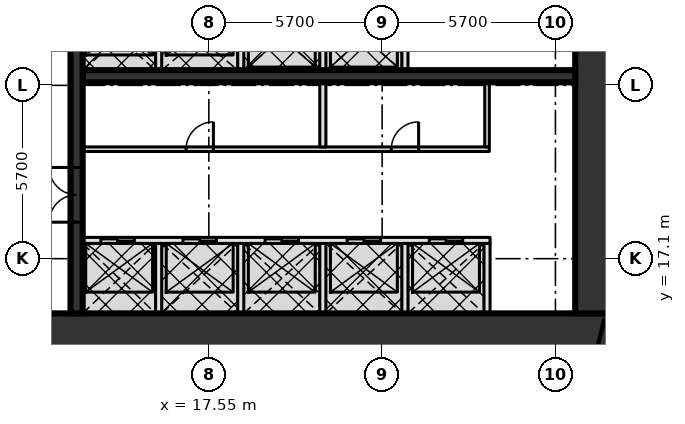
"""IFC4 building model, lengths in metres.
Left out: names, types, materials, properties, quantities, classifications, styles, units other than length and angle.
Written with IfcOpenShell. Run it as: python <this file> out.ifc"""

import sys

from ifc_helpers import new_model, si_unit, direction, frame, frame_2d, origin, place, context, subcontext, project, spatial, rectangle, extrude, element, fill, save


model = new_model("IFC4")
c1 = context("Model", 3, precision=1e-05, world=origin(), true_north=direction((0.0, 1.0)))
c2 = subcontext(c1, "Body", "Model", "MODEL_VIEW")
j1 = project(units=[si_unit("LENGTHUNIT", "METRE"), si_unit("PLANEANGLEUNIT", "RADIAN")], contexts=[c1])
p1 = place(None, origin())
s1 = spatial("IfcSite", under=j1, at=p1, CompositionType="ELEMENT")
p2 = place(p1, origin())
s2 = spatial("IfcBuilding", under=s1, at=p2, CompositionType="ELEMENT")
p3 = place(p2, frame((0.0, 0.0, -9.0)))
s3 = spatial("IfcBuildingStorey", under=s2, at=p3, CompositionType="ELEMENT", Elevation=-9.0)
p4 = place(p3, frame((8.0, 14.7, 0.0), z_axis=(0.0, 0.0, 1.0), x_axis=(1.0, 0.0, 0.0)))
e1 = element("IfcWall", 1, at=p4, inside=s3, PredefinedType="SHEAR", context=c2, shape_type="SweptSolid", body=[
    extrude(rectangle(XDim=22.8, YDim=1.2, at=frame_2d((11.4, 0.0))), origin(), (0.0, 0.0, 1.0), 4.05),
])
p5 = place(p4, frame((2.3, 0.0, 0.0)))
e2 = element("IfcOpeningElement", 2, at=p5, cuts=e1, PredefinedType="OPENING", context=c2, shape_type="SweptSolid", body=[
    extrude(rectangle(XDim=1.8, YDim=2.1, at=frame_2d((0.9, 1.05))), frame((0.0, 0.61, 0.0), z_axis=(0.0, -1.0, 0.0), x_axis=(1.0, 0.0, 0.0)), (0.0, 0.0, 1.0), 1.22),
])
p6 = place(p3, frame((30.2, 15.3, 0.0), z_axis=(0.0, 0.0, 1.0), x_axis=(0.0, 1.0, 0.0)))
e3 = element("IfcWall", 3, at=p6, inside=s3, PredefinedType="SHEAR", context=c2, shape_type="SweptSolid", body=[
    extrude(rectangle(XDim=20.4, YDim=1.2, at=frame_2d((10.2, 0.0))), origin(), (0.0, 0.0, 1.0), 4.05),
])
p7 = place(p3, frame((13.4, 17.7, 0.0), z_axis=(0.0, 0.0, 1.0), x_axis=(1.0, 0.0, 0.0)))
e4 = element("IfcWall", 4, at=p7, inside=s3, PredefinedType="SOLIDWALL", context=c2, shape_type="SweptSolid", body=[
    extrude(rectangle(XDim=13.4, YDim=0.2, at=frame_2d((6.7, 0.0))), origin(), (0.0, 0.0, 1.0), 4.05),
])
p8 = place(p7, frame((0.6, 0.0, 0.0)))
e5 = element("IfcOpeningElement", 5, at=p8, cuts=e4, PredefinedType="OPENING", context=c2, shape_type="SweptSolid", body=[
    extrude(rectangle(XDim=1.1, YDim=2.1, at=frame_2d((0.55, 1.05))), frame((0.0, 0.11, 0.0), z_axis=(0.0, -1.0, 0.0), x_axis=(1.0, 0.0, 0.0)), (0.0, 0.0, 1.0), 0.22),
])
p9 = place(p7, frame((3.3, 0.0, 0.0)))
e6 = element("IfcOpeningElement", 6, at=p9, cuts=e4, PredefinedType="OPENING", context=c2, shape_type="SweptSolid", body=[
    extrude(rectangle(XDim=1.1, YDim=2.1, at=frame_2d((0.55, 1.05))), frame((0.0, 0.11, 0.0), z_axis=(0.0, -1.0, 0.0), x_axis=(1.0, 0.0, 0.0)), (0.0, 0.0, 1.0), 0.22),
])
p10 = place(p7, frame((6.0, 0.0, 0.0)))
e7 = element("IfcOpeningElement", 7, at=p10, cuts=e4, PredefinedType="OPENING", context=c2, shape_type="SweptSolid", body=[
    extrude(rectangle(XDim=1.1, YDim=2.1, at=frame_2d((0.55, 1.05))), frame((0.0, 0.11, 0.0), z_axis=(0.0, -1.0, 0.0), x_axis=(1.0, 0.0, 0.0)), (0.0, 0.0, 1.0), 0.22),
])
p11 = place(p7, frame((8.7, 0.0, 0.0)))
e8 = element("IfcOpeningElement", 8, at=p11, cuts=e4, PredefinedType="OPENING", context=c2, shape_type="SweptSolid", body=[
    extrude(rectangle(XDim=1.1, YDim=2.1, at=frame_2d((0.55, 1.05))), frame((0.0, 0.11, 0.0), z_axis=(0.0, -1.0, 0.0), x_axis=(1.0, 0.0, 0.0)), (0.0, 0.0, 1.0), 0.22),
])
p12 = place(p7, frame((11.4, 0.0, 0.0)))
e9 = element("IfcOpeningElement", 9, at=p12, cuts=e4, PredefinedType="OPENING", context=c2, shape_type="SweptSolid", body=[
    extrude(rectangle(XDim=1.1, YDim=2.1, at=frame_2d((0.55, 1.05))), frame((0.0, 0.11, 0.0), z_axis=(0.0, -1.0, 0.0), x_axis=(1.0, 0.0, 0.0)), (0.0, 0.0, 1.0), 0.22),
])
p13 = place(p3, frame((13.4, 20.7, 0.0), z_axis=(0.0, 0.0, 1.0), x_axis=(1.0, 0.0, 0.0)))
e10 = element("IfcWall", 10, at=p13, inside=s3, PredefinedType="PARTITIONING", context=c2, shape_type="SweptSolid", body=[
    extrude(rectangle(XDim=13.375, YDim=0.15, at=frame_2d((6.688, 0.0))), origin(), (0.0, 0.0, 1.0), 4.05),
])
p14 = place(p13, frame((3.4, 0.0, 0.0)))
e11 = element("IfcOpeningElement", 11, at=p14, cuts=e10, PredefinedType="OPENING", context=c2, shape_type="SweptSolid", body=[
    extrude(rectangle(XDim=0.9, YDim=2.1, at=frame_2d((0.45, 1.05))), frame((0.0, 0.085, 0.0), z_axis=(0.0, -1.0, 0.0), x_axis=(1.0, 0.0, 0.0)), (0.0, 0.0, 1.0), 0.17),
])
p15 = place(p13, frame((10.15, 0.0, 0.0)))
e12 = element("IfcOpeningElement", 12, at=p15, cuts=e10, PredefinedType="OPENING", context=c2, shape_type="SweptSolid", body=[
    extrude(rectangle(XDim=0.9, YDim=2.1, at=frame_2d((0.45, 1.05))), frame((0.0, 0.085, 0.0), z_axis=(0.0, -1.0, 0.0), x_axis=(1.0, 0.0, 0.0)), (0.0, 0.0, 1.0), 0.17),
])
p16 = place(p3, frame((13.4, 23.1, 0.0), z_axis=(0.0, 0.0, 1.0), x_axis=(1.0, 0.0, 0.0)))
e13 = element("IfcWall", 13, at=p16, inside=s3, PredefinedType="SHEAR", context=c2, shape_type="SweptSolid", body=[
    extrude(rectangle(XDim=16.2, YDim=0.4, at=frame_2d((8.1, 0.0))), origin(), (0.0, 0.0, 1.0), 4.05),
])
p17 = place(p3, frame((13.2, 15.3, 0.0), z_axis=(0.0, 0.0, 1.0), x_axis=(0.0, 1.0, 0.0)))
e14 = element("IfcWall", 14, at=p17, inside=s3, PredefinedType="SHEAR", context=c2, shape_type="SweptSolid", body=[
    extrude(rectangle(XDim=20.4, YDim=0.4, at=frame_2d((10.2, 0.0))), origin(), (0.0, 0.0, 1.0), 4.05),
])
p18 = place(p17, frame((3.0, 0.0, 0.0)))
e15 = element("IfcOpeningElement", 15, at=p18, cuts=e14, PredefinedType="OPENING", context=c2, shape_type="SweptSolid", body=[
    extrude(rectangle(XDim=1.8, YDim=2.1, at=frame_2d((0.9, 1.05))), frame((0.0, 0.21, 0.0), z_axis=(0.0, -1.0, 0.0), x_axis=(1.0, 0.0, 0.0)), (0.0, 0.0, 1.0), 0.42),
])
p19 = place(p17, frame((11.1, 0.0, 0.0)))
e16 = element("IfcOpeningElement", 16, at=p19, cuts=e14, PredefinedType="OPENING", context=c2, shape_type="SweptSolid", body=[
    extrude(rectangle(XDim=1.2, YDim=2.1, at=frame_2d((0.6, 1.05))), frame((0.0, 0.21, 0.0), z_axis=(0.0, -1.0, 0.0), x_axis=(1.0, 0.0, 0.0)), (0.0, 0.0, 1.0), 0.42),
])
p20 = place(p3, frame((15.9, 15.3, 0.0), z_axis=(0.0, 0.0, 1.0), x_axis=(0.0, 1.0, 0.0)))
e17 = element("IfcWall", 17, at=p20, inside=s3, PredefinedType="SOLIDWALL", context=c2, shape_type="SweptSolid", body=[
    extrude(rectangle(XDim=2.3, YDim=0.2, at=frame_2d((1.15, 0.0))), origin(), (0.0, 0.0, 1.0), 4.05),
])
p21 = place(p3, frame((15.9, 23.3, 0.0), z_axis=(0.0, 0.0, 1.0), x_axis=(0.0, 1.0, 0.0)))
e18 = element("IfcWall", 18, at=p21, inside=s3, PredefinedType="SOLIDWALL", context=c2, shape_type="SweptSolid", body=[
    extrude(rectangle(XDim=2.1, YDim=0.2, at=frame_2d((1.05, 0.0))), origin(), (0.0, 0.0, 1.0), 4.05),
])
p22 = place(p3, frame((18.6, 15.3, 0.0), z_axis=(0.0, 0.0, 1.0), x_axis=(0.0, 1.0, 0.0)))
e19 = element("IfcWall", 19, at=p22, inside=s3, PredefinedType="SOLIDWALL", context=c2, shape_type="SweptSolid", body=[
    extrude(rectangle(XDim=2.3, YDim=0.2, at=frame_2d((1.15, 0.0))), origin(), (0.0, 0.0, 1.0), 4.05),
])
p23 = place(p3, frame((18.6, 23.3, 0.0), z_axis=(0.0, 0.0, 1.0), x_axis=(0.0, 1.0, 0.0)))
e20 = element("IfcWall", 20, at=p23, inside=s3, PredefinedType="SOLIDWALL", context=c2, shape_type="SweptSolid", body=[
    extrude(rectangle(XDim=5.1, YDim=0.2, at=frame_2d((2.55, 0.0))), origin(), (0.0, 0.0, 1.0), 4.05),
])
p24 = place(p23, frame((3.1, 0.0, 0.0)))
e21 = element("IfcOpeningElement", 21, at=p24, cuts=e20, PredefinedType="OPENING", context=c2, shape_type="SweptSolid", body=[
    extrude(rectangle(XDim=1.2, YDim=2.1, at=frame_2d((0.6, 1.05))), frame((0.0, 0.11, 0.0), z_axis=(0.0, -1.0, 0.0), x_axis=(1.0, 0.0, 0.0)), (0.0, 0.0, 1.0), 0.22),
])
p25 = place(p3, frame((21.3, 15.3, 0.0), z_axis=(0.0, 0.0, 1.0), x_axis=(0.0, 1.0, 0.0)))
e22 = element("IfcWall", 22, at=p25, inside=s3, PredefinedType="SOLIDWALL", context=c2, shape_type="SweptSolid", body=[
    extrude(rectangle(XDim=2.3, YDim=0.2, at=frame_2d((1.15, 0.0))), origin(), (0.0, 0.0, 1.0), 4.05),
])
p26 = place(p3, frame((21.3, 20.775, 0.0), z_axis=(0.0, 0.0, 1.0), x_axis=(0.0, 1.0, 0.0)))
e23 = element("IfcWall", 23, at=p26, inside=s3, PredefinedType="SOLIDWALL", context=c2, shape_type="SweptSolid", body=[
    extrude(rectangle(XDim=4.625, YDim=0.2, at=frame_2d((2.312, 0.0))), origin(), (0.0, 0.0, 1.0), 4.05),
])
p27 = place(p3, frame((24.0, 15.3, 0.0), z_axis=(0.0, 0.0, 1.0), x_axis=(0.0, 1.0, 0.0)))
e24 = element("IfcWall", 24, at=p27, inside=s3, PredefinedType="SOLIDWALL", context=c2, shape_type="SweptSolid", body=[
    extrude(rectangle(XDim=2.3, YDim=0.2, at=frame_2d((1.15, 0.0))), origin(), (0.0, 0.0, 1.0), 4.05),
])
p28 = place(p3, frame((24.0, 23.3, 0.0), z_axis=(0.0, 0.0, 1.0), x_axis=(0.0, 1.0, 0.0)))
e25 = element("IfcWall", 25, at=p28, inside=s3, PredefinedType="SOLIDWALL", context=c2, shape_type="SweptSolid", body=[
    extrude(rectangle(XDim=2.1, YDim=0.2, at=frame_2d((1.05, 0.0))), origin(), (0.0, 0.0, 1.0), 4.05),
])
p29 = place(p3, frame((26.7, 15.3, 0.0), z_axis=(0.0, 0.0, 1.0), x_axis=(0.0, 1.0, 0.0)))
e26 = element("IfcWall", 26, at=p29, inside=s3, PredefinedType="SOLIDWALL", context=c2, shape_type="SweptSolid", body=[
    extrude(rectangle(XDim=2.3, YDim=0.2, at=frame_2d((1.15, 0.0))), origin(), (0.0, 0.0, 1.0), 4.05),
])
p30 = place(p3, frame((26.7, 20.775, 0.0), z_axis=(0.0, 0.0, 1.0), x_axis=(0.0, 1.0, 0.0)))
e27 = element("IfcWall", 27, at=p30, inside=s3, PredefinedType="PARTITIONING", context=c2, shape_type="SweptSolid", body=[
    extrude(rectangle(XDim=2.125, YDim=0.15, at=frame_2d((1.062, 0.0))), origin(), (0.0, 0.0, 1.0), 4.05),
])
p31 = place(p8, origin())
e28 = element("IfcDoor", 28, at=p31, inside=s3, OperationType="SLIDING_TO_LEFT", PredefinedType="DOOR", context=c2, shape_type="SweptSolid", body=[
    extrude(rectangle(XDim=1.1, YDim=2.1, at=frame_2d((0.55, 1.05))), frame((0.0, 0.025, 0.0), z_axis=(0.0, -1.0, 0.0), x_axis=(1.0, 0.0, 0.0)), (0.0, 0.0, 1.0), 0.05),
])
fill(e5, e28)
p32 = place(p9, origin())
e29 = element("IfcDoor", 29, at=p32, inside=s3, OperationType="SLIDING_TO_LEFT", PredefinedType="DOOR", context=c2, shape_type="SweptSolid", body=[
    extrude(rectangle(XDim=1.1, YDim=2.1, at=frame_2d((0.55, 1.05))), frame((0.0, 0.025, 0.0), z_axis=(0.0, -1.0, 0.0), x_axis=(1.0, 0.0, 0.0)), (0.0, 0.0, 1.0), 0.05),
])
fill(e6, e29)
p33 = place(p10, origin())
e30 = element("IfcDoor", 30, at=p33, inside=s3, OperationType="SLIDING_TO_LEFT", PredefinedType="DOOR", context=c2, shape_type="SweptSolid", body=[
    extrude(rectangle(XDim=1.1, YDim=2.1, at=frame_2d((0.55, 1.05))), frame((0.0, 0.025, 0.0), z_axis=(0.0, -1.0, 0.0), x_axis=(1.0, 0.0, 0.0)), (0.0, 0.0, 1.0), 0.05),
])
fill(e7, e30)
p34 = place(p11, origin())
e31 = element("IfcDoor", 31, at=p34, inside=s3, OperationType="SLIDING_TO_LEFT", PredefinedType="DOOR", context=c2, shape_type="SweptSolid", body=[
    extrude(rectangle(XDim=1.1, YDim=2.1, at=frame_2d((0.55, 1.05))), frame((0.0, 0.025, 0.0), z_axis=(0.0, -1.0, 0.0), x_axis=(1.0, 0.0, 0.0)), (0.0, 0.0, 1.0), 0.05),
])
fill(e8, e31)
p35 = place(p12, origin())
e32 = element("IfcDoor", 32, at=p35, inside=s3, OperationType="SLIDING_TO_LEFT", PredefinedType="DOOR", context=c2, shape_type="SweptSolid", body=[
    extrude(rectangle(XDim=1.1, YDim=2.1, at=frame_2d((0.55, 1.05))), frame((0.0, 0.025, 0.0), z_axis=(0.0, -1.0, 0.0), x_axis=(1.0, 0.0, 0.0)), (0.0, 0.0, 1.0), 0.05),
])
fill(e9, e32)
p36 = place(p14, origin())
e33 = element("IfcDoor", 33, at=p36, inside=s3, OperationType="SINGLE_SWING_RIGHT", PredefinedType="DOOR", context=c2, shape_type="SweptSolid", body=[
    extrude(rectangle(XDim=0.9, YDim=2.1, at=frame_2d((0.45, 1.05))), frame((0.0, 0.025, 0.0), z_axis=(0.0, -1.0, 0.0), x_axis=(1.0, 0.0, 0.0)), (0.0, 0.0, 1.0), 0.05),
])
fill(e11, e33)
p37 = place(p15, origin())
e34 = element("IfcDoor", 34, at=p37, inside=s3, OperationType="SINGLE_SWING_RIGHT", PredefinedType="DOOR", context=c2, shape_type="SweptSolid", body=[
    extrude(rectangle(XDim=0.9, YDim=2.1, at=frame_2d((0.45, 1.05))), frame((0.0, 0.025, 0.0), z_axis=(0.0, -1.0, 0.0), x_axis=(1.0, 0.0, 0.0)), (0.0, 0.0, 1.0), 0.05),
])
fill(e12, e34)
p38 = place(p18, origin())
e35 = element("IfcDoor", 35, at=p38, inside=s3, OperationType="DOUBLE_DOOR_SINGLE_SWING", PredefinedType="DOOR", context=c2, shape_type="SweptSolid", body=[
    extrude(rectangle(XDim=1.8, YDim=2.1, at=frame_2d((0.9, 1.05))), frame((0.0, 0.025, 0.0), z_axis=(0.0, -1.0, 0.0), x_axis=(1.0, 0.0, 0.0)), (0.0, 0.0, 1.0), 0.05),
])
fill(e15, e35)
save(model, sys.argv[1])
